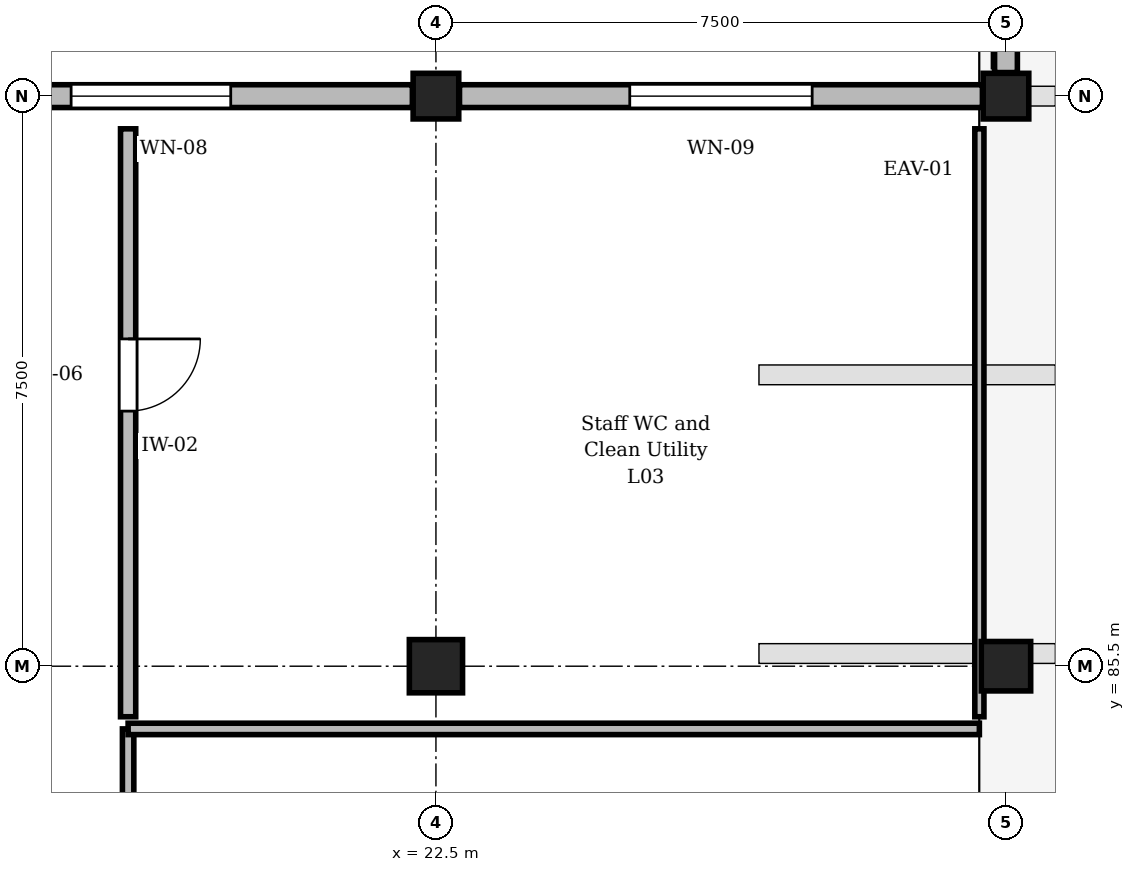
"""IFC4 building model, lengths in metres.
Left out: names, types, materials, properties, quantities, classifications, styles, units other than length and angle.
Written with IfcOpenShell. Run it as: python <this file> out.ifc"""

import sys

from ifc_helpers import new_model, si_unit, direction, frame, frame_2d, origin, origin_2d, place, context, subcontext, project, spatial, rectangle, circle, extrude, element, fill, save


model = new_model("IFC4")
c1 = context("Model", 3, precision=1e-05, world=origin(), true_north=direction((0.0, 1.0)))
c2 = subcontext(c1, "Body", "Model", "MODEL_VIEW")
j1 = project(units=[si_unit("LENGTHUNIT", "METRE"), si_unit("PLANEANGLEUNIT", "RADIAN")], contexts=[c1])
p1 = place(None, origin())
s1 = spatial("IfcSite", under=j1, at=p1, CompositionType="ELEMENT")
p2 = place(p1, origin())
s2 = spatial("IfcBuilding", under=s1, at=p2, CompositionType="ELEMENT")
p3 = place(p2, frame((0.0, 0.0, 14.1)))
s3 = spatial("IfcBuildingStorey", under=s2, at=p3, CompositionType="ELEMENT", Elevation=14.1)
p4 = place(p3, frame((22.5, 85.5, 0.0), z_axis=(0.0, 0.0, 1.0), x_axis=(1.0, 0.0, 0.0)))
e1 = element("IfcColumn", 1, at=p4, inside=s3, PredefinedType="COLUMN", context=c2, shape_type="SweptSolid", body=[
    extrude(rectangle(XDim=0.7, YDim=0.7, at=origin_2d()), origin(), (0.0, 0.0, 1.0), 3.75),
])
p5 = place(p3, frame((22.5, 93.0, 0.0), z_axis=(0.0, 0.0, 1.0), x_axis=(1.0, 0.0, 0.0)))
e2 = element("IfcColumn", 2, at=p5, inside=s3, PredefinedType="COLUMN", context=c2, shape_type="SweptSolid", body=[
    extrude(circle(Radius=0.3, at=origin_2d()), origin(), (0.0, 0.0, 1.0), 3.75),
])
p6 = place(p3, frame((30.0, 85.5, 0.0), z_axis=(0.0, 0.0, 1.0), x_axis=(1.0, 0.0, 0.0)))
e3 = element("IfcColumn", 3, at=p6, inside=s3, PredefinedType="COLUMN", context=c2, shape_type="SweptSolid", body=[
    extrude(rectangle(XDim=0.65, YDim=0.65, at=origin_2d()), origin(), (0.0, 0.0, 1.0), 3.75),
])
p7 = place(p3, frame((30.0, 93.0, 0.0), z_axis=(0.0, 0.0, 1.0), x_axis=(1.0, 0.0, 0.0)))
e4 = element("IfcColumn", 4, at=p7, inside=s3, PredefinedType="COLUMN", context=c2, shape_type="SweptSolid", body=[
    extrude(rectangle(XDim=0.6, YDim=0.6, at=origin_2d()), origin(), (0.0, 0.0, 1.0), 3.75),
])
p8 = place(p3, frame((15.31, 93.0, 0.0), z_axis=(0.0, 0.0, 1.0), x_axis=(1.0, 0.0, 0.0)))
e5 = element("IfcWall", 5, at=p8, inside=s3, PredefinedType="STANDARD", context=c2, shape_type="SweptSolid", body=[
    extrude(rectangle(XDim=6.88, YDim=0.3, at=frame_2d((3.44, 0.0))), origin(), (0.0, 0.0, 1.0), 2.87),
])
p9 = place(p8, frame((2.39, 0.0, 0.9)))
e6 = element("IfcOpeningElement", 6, at=p9, cuts=e5, PredefinedType="OPENING", context=c2, shape_type="SweptSolid", body=[
    extrude(rectangle(XDim=2.1, YDim=1.69, at=frame_2d((1.05, 0.845))), frame((0.0, 0.16, 0.0), z_axis=(0.0, -1.0, 0.0), x_axis=(1.0, 0.0, 0.0)), (0.0, 0.0, 1.0), 0.32),
])
p10 = place(p3, frame((22.81, 93.0, 0.0), z_axis=(0.0, 0.0, 1.0), x_axis=(1.0, 0.0, 0.0)))
e7 = element("IfcWall", 7, at=p10, inside=s3, PredefinedType="STANDARD", context=c2, shape_type="SweptSolid", body=[
    extrude(rectangle(XDim=6.88, YDim=0.3, at=frame_2d((3.44, 0.0))), origin(), (0.0, 0.0, 1.0), 2.87),
])
p11 = place(p10, frame((2.24, 0.0, 0.9)))
e8 = element("IfcOpeningElement", 8, at=p11, cuts=e7, PredefinedType="OPENING", context=c2, shape_type="SweptSolid", body=[
    extrude(rectangle(XDim=2.4, YDim=1.69, at=frame_2d((1.2, 0.845))), frame((0.0, 0.16, 0.0), z_axis=(0.0, -1.0, 0.0), x_axis=(1.0, 0.0, 0.0)), (0.0, 0.0, 1.0), 0.32),
])
p12 = place(p3, frame((30.0, 93.31, 0.0), z_axis=(0.0, 0.0, 1.0), x_axis=(0.0, 1.0, 0.0)))
e9 = element("IfcWall", 9, at=p12, inside=s3, PredefinedType="STANDARD", context=c2, shape_type="SweptSolid", body=[
    extrude(rectangle(XDim=6.955, YDim=0.3, at=frame_2d((3.478, 0.0))), origin(), (0.0, 0.0, 1.0), 3.47),
])
p13 = place(p12, frame((2.278, 0.0, 1.1)))
e10 = element("IfcOpeningElement", 10, at=p13, cuts=e9, PredefinedType="OPENING", context=c2, shape_type="SweptSolid", body=[
    extrude(rectangle(XDim=2.4, YDim=1.2, at=frame_2d((1.2, 0.6))), frame((0.0, 0.16, 0.0), z_axis=(0.0, -1.0, 0.0), x_axis=(1.0, 0.0, 0.0)), (0.0, 0.0, 1.0), 0.32),
])
p14 = place(p3, frame((18.45, 84.675, 0.0), z_axis=(0.0, 0.0, 1.0), x_axis=(0.0, -1.0, 0.0)))
e11 = element("IfcWall", 11, at=p14, inside=s3, PredefinedType="PARTITIONING", context=c2, shape_type="SweptSolid", body=[
    extrude(rectangle(XDim=7.735, YDim=0.15, at=frame_2d((3.868, 0.0))), origin(), (0.0, 0.0, 1.0), 3.055),
])
p15 = place(p14, frame((3.192, 0.0, 0.0)))
e12 = element("IfcOpeningElement", 12, at=p15, cuts=e11, PredefinedType="OPENING", context=c2, shape_type="SweptSolid", body=[
    extrude(rectangle(XDim=1.35, YDim=2.25, at=frame_2d((0.675, 1.125))), frame((0.0, 0.085, 0.0), z_axis=(0.0, -1.0, 0.0), x_axis=(1.0, 0.0, 0.0)), (0.0, 0.0, 1.0), 0.17),
])
p16 = place(p3, frame((18.45, 92.57, 0.0), z_axis=(0.0, 0.0, 1.0), x_axis=(0.0, -1.0, 0.0)))
e13 = element("IfcWall", 13, at=p16, inside=s3, PredefinedType="STANDARD", context=c2, shape_type="SweptSolid", body=[
    extrude(rectangle(XDim=7.735, YDim=0.2, at=frame_2d((3.868, 0.0))), origin(), (0.0, 0.0, 1.0), 3.055),
])
p17 = place(p16, frame((2.764, 0.0, 0.0)))
e14 = element("IfcOpeningElement", 14, at=p17, cuts=e13, PredefinedType="OPENING", context=c2, shape_type="SweptSolid", body=[
    extrude(rectangle(XDim=0.95, YDim=2.15, at=frame_2d((0.475, 1.075))), frame((0.0, 0.11, 0.0), z_axis=(0.0, -1.0, 0.0), x_axis=(1.0, 0.0, 0.0)), (0.0, 0.0, 1.0), 0.22),
])
p18 = place(p3, frame((18.45, 84.675, 0.0), z_axis=(0.0, 0.0, 1.0), x_axis=(1.0, 0.0, 0.0)))
e15 = element("IfcWall", 15, at=p18, inside=s3, PredefinedType="PARTITIONING", context=c2, shape_type="SweptSolid", body=[
    extrude(rectangle(XDim=11.2, YDim=0.15, at=frame_2d((5.6, 0.0))), origin(), (0.0, 0.0, 1.0), 3.455),
])
p19 = place(p3, frame((29.65, 84.835, 0.0), z_axis=(0.0, 0.0, 1.0), x_axis=(0.0, 1.0, 0.0)))
e16 = element("IfcWall", 16, at=p19, inside=s3, PredefinedType="PARTITIONING", context=c2, shape_type="SweptSolid", body=[
    extrude(rectangle(XDim=7.735, YDim=0.12, at=frame_2d((3.868, 0.0))), origin(), (0.0, 0.0, 1.0), 2.855),
])
p20 = place(p9, origin())
e17 = element("IfcWindow", 17, at=p20, inside=s3, PartitioningType="SINGLE_PANEL", PredefinedType="WINDOW", context=c2, shape_type="SweptSolid", body=[
    extrude(rectangle(XDim=2.1, YDim=1.69, at=frame_2d((1.05, 0.845))), frame((0.0, 0.03, 0.0), z_axis=(0.0, -1.0, 0.0), x_axis=(1.0, 0.0, 0.0)), (0.0, 0.0, 1.0), 0.06),
])
fill(e6, e17)
p21 = place(p11, origin())
e18 = element("IfcWindow", 18, at=p21, inside=s3, PartitioningType="SINGLE_PANEL", PredefinedType="WINDOW", context=c2, shape_type="SweptSolid", body=[
    extrude(rectangle(XDim=2.4, YDim=1.69, at=frame_2d((1.2, 0.845))), frame((0.0, 0.03, 0.0), z_axis=(0.0, -1.0, 0.0), x_axis=(1.0, 0.0, 0.0)), (0.0, 0.0, 1.0), 0.06),
])
fill(e8, e18)
p22 = place(p17, origin())
e19 = element("IfcDoor", 19, at=p22, inside=s3, OperationType="SINGLE_SWING_LEFT", PredefinedType="DOOR", context=c2, shape_type="SweptSolid", body=[
    extrude(rectangle(XDim=0.95, YDim=2.15, at=frame_2d((0.475, 1.075))), frame((0.0, 0.025, 0.0), z_axis=(0.0, -1.0, 0.0), x_axis=(1.0, 0.0, 0.0)), (0.0, 0.0, 1.0), 0.05),
])
fill(e14, e19)
save(model, sys.argv[1])
